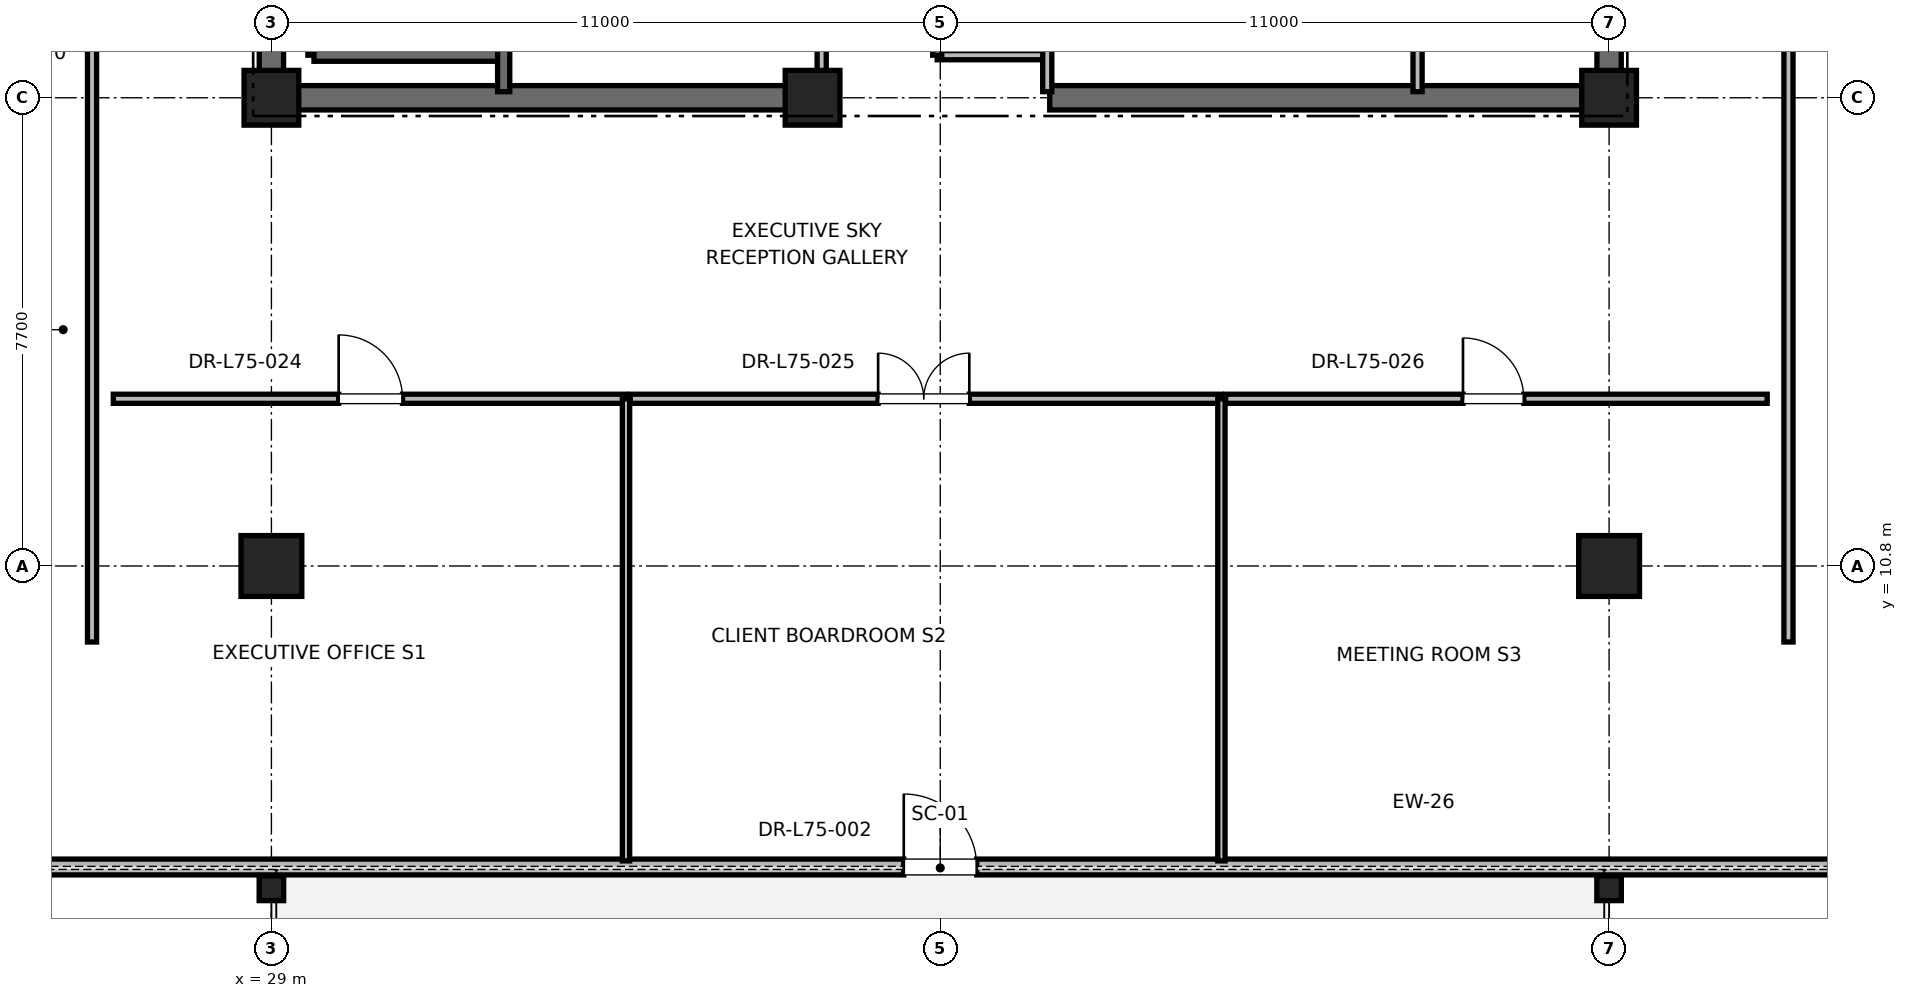
"""IFC4 building model, lengths in metres.
Left out: names, types, materials, properties, quantities, classifications, styles, units other than length and angle.
Written with IfcOpenShell. Run it as: python <this file> out.ifc"""

import sys

from ifc_helpers import new_model, si_unit, direction, frame, frame_2d, origin, origin_2d, place, context, subcontext, project, spatial, rectangle, i_section, extrude, element, fill, save


model = new_model("IFC4")
c1 = context("Model", 3, precision=1e-05, world=origin(), true_north=direction((0.0, 1.0)))
c2 = subcontext(c1, "Body", "Model", "MODEL_VIEW")
j1 = project(units=[si_unit("LENGTHUNIT", "METRE"), si_unit("PLANEANGLEUNIT", "RADIAN")], contexts=[c1])
p1 = place(None, origin())
s1 = spatial("IfcSite", under=j1, at=p1, CompositionType="ELEMENT")
p2 = place(p1, origin())
s2 = spatial("IfcBuilding", under=s1, at=p2, CompositionType="ELEMENT")
p3 = place(p2, frame((0.0, 0.0, 322.8)))
s3 = spatial("IfcBuildingStorey", under=s2, at=p3, CompositionType="ELEMENT", Elevation=322.8)
for number, where, z_axis, x_axis in (
    (1, (29.0, 10.8, 0.0), (0.0, 0.0, 1.0), (1.0, 0.0, 0.0)),
    (2, (51.0, 10.8, 0.0), (0.0, 0.0, 1.0), (1.0, 0.0, 0.0)),
):
    element("IfcColumn", number, at=place(p3, frame(where, z_axis=z_axis, x_axis=x_axis)), inside=s3, PredefinedType="COLUMN", context=c2, shape_type="SweptSolid", body=[
        extrude(rectangle(XDim=1.0, YDim=1.0, at=origin_2d()), origin(), (0.0, 0.0, 1.0), 4.0),
    ])
for number, where, z_axis, x_axis in (
    (3, (29.0, 5.5, 0.0), (0.0, 0.0, 1.0), (1.0, 0.0, 0.0)),
    (4, (51.0, 5.5, 0.0), (0.0, 0.0, 1.0), (1.0, 0.0, 0.0)),
):
    element("IfcColumn", number, at=place(p3, frame(where, z_axis=z_axis, x_axis=x_axis)), inside=s3, PredefinedType="COLUMN", context=c2, shape_type="SweptSolid", body=[
        extrude(i_section(OverallWidth=0.403, OverallDepth=0.406, WebThickness=0.027, FlangeThickness=0.043, FilletRadius=0.015, at=origin_2d()), origin(), (0.0, 0.0, 1.0), 4.0),
    ])
for number, where, z_axis, x_axis in (
    (5, (29.0, 18.5, 0.0), (0.0, 0.0, 1.0), (1.0, 0.0, 0.0)),
    (6, (51.0, 18.5, 0.0), (0.0, 0.0, 1.0), (1.0, 0.0, 0.0)),
    (7, (37.9, 18.5, 0.0), (0.0, 0.0, 1.0), (1.0, 0.0, 0.0)),
):
    element("IfcColumn", number, at=place(p3, frame(where, z_axis=z_axis, x_axis=x_axis)), inside=s3, PredefinedType="PILASTER", context=c2, shape_type="SweptSolid", body=[
        extrude(rectangle(XDim=0.9, YDim=0.9, at=origin_2d()), origin(), (0.0, 0.0, 1.0), 4.0),
    ])
for number, where, z_axis, x_axis in (
    (8, (29.0, 18.5, 0.0), (0.0, 0.0, 1.0), (1.0, 0.0, 0.0)),
    (9, (41.8, 18.5, 0.0), (0.0, 0.0, 1.0), (1.0, 0.0, 0.0)),
):
    element("IfcWall", number, at=place(p3, frame(where, z_axis=z_axis, x_axis=x_axis)), inside=s3, PredefinedType="SHEAR", context=c2, shape_type="SweptSolid", body=[
        extrude(rectangle(XDim=9.2, YDim=0.4, at=frame_2d((4.6, 0.0))), origin(), (0.0, 0.0, 1.0), 3.785),
    ])
p4 = place(p3, frame((29.0, 18.5, 0.0), z_axis=(0.0, 0.0, 1.0), x_axis=(0.0, 1.0, 0.0)))
e10 = element("IfcWall", 10, at=p4, inside=s3, PredefinedType="SHEAR", context=c2, shape_type="SweptSolid", body=[
    extrude(rectangle(XDim=8.8, YDim=0.4, at=frame_2d((4.4, 0.0))), origin(), (0.0, 0.0, 1.0), 3.785),
])
p5 = place(p3, frame((51.0, 18.5, 0.0), z_axis=(0.0, 0.0, 1.0), x_axis=(0.0, 1.0, 0.0)))
e11 = element("IfcWall", 11, at=p5, inside=s3, PredefinedType="SHEAR", context=c2, shape_type="SweptSolid", body=[
    extrude(rectangle(XDim=5.8, YDim=0.4, at=frame_2d((2.9, 0.0))), origin(), (0.0, 0.0, 1.0), 3.785),
])
p6 = place(p3, frame((18.9, 5.85, 0.0), z_axis=(0.0, 0.0, 1.0), x_axis=(1.0, 0.0, 0.0)))
e12 = element("IfcWall", 12, at=p6, inside=s3, PredefinedType="PARAPET", context=c2, shape_type="SweptSolid", body=[
    extrude(rectangle(XDim=42.2, YDim=0.26, at=frame_2d((21.1, 0.0))), origin(), (0.0, 0.0, 1.0), 3.196),
])
p7 = place(p6, frame((4.2, 0.0, 0.85)))
e13 = element("IfcOpeningElement", 13, at=p7, cuts=e12, PredefinedType="OPENING", context=c2, shape_type="SweptSolid", body=[
    extrude(rectangle(XDim=1.6, YDim=2.1, at=frame_2d((0.8, 1.05))), frame((0.0, 0.13, 0.0), z_axis=(0.0, -1.0, 0.0), x_axis=(1.0, 0.0, 0.0)), (0.0, 0.0, 1.0), 0.26),
])
p8 = place(p6, frame((20.5, 0.0, 0.0)))
e14 = element("IfcOpeningElement", 14, at=p8, cuts=e12, PredefinedType="OPENING", context=c2, shape_type="SweptSolid", body=[
    extrude(rectangle(XDim=1.2, YDim=2.2, at=frame_2d((0.6, 1.1))), frame((0.0, 0.13, 0.0), z_axis=(0.0, -1.0, 0.0), x_axis=(1.0, 0.0, 0.0)), (0.0, 0.0, 1.0), 0.26),
])
p9 = place(p6, frame((36.4, 0.0, 0.85)))
e15 = element("IfcOpeningElement", 15, at=p9, cuts=e12, PredefinedType="OPENING", context=c2, shape_type="SweptSolid", body=[
    extrude(rectangle(XDim=1.6, YDim=2.1, at=frame_2d((0.8, 1.05))), frame((0.0, 0.13, 0.0), z_axis=(0.0, -1.0, 0.0), x_axis=(1.0, 0.0, 0.0)), (0.0, 0.0, 1.0), 0.26),
])
p10 = place(p3, frame((29.7, 19.2, 0.0), z_axis=(0.0, 0.0, 1.0), x_axis=(0.0, 1.0, 0.0)))
e16 = element("IfcWall", 16, at=p10, inside=s3, PredefinedType="SOLIDWALL", context=c2, shape_type="SweptSolid", body=[
    extrude(rectangle(XDim=8.15, YDim=0.2, at=frame_2d((4.075, 0.0))), origin(), (0.0, 0.0, 1.0), 3.785),
])
p11 = place(p3, frame((29.7, 19.2, 0.0), z_axis=(0.0, 0.0, 1.0), x_axis=(1.0, 0.0, 0.0)))
e17 = element("IfcWall", 17, at=p11, inside=s3, PredefinedType="SOLIDWALL", context=c2, shape_type="SweptSolid", body=[
    extrude(rectangle(XDim=3.12, YDim=0.2, at=frame_2d((1.56, 0.0))), origin(), (0.0, 0.0, 1.0), 3.785),
])
p12 = place(p3, frame((32.82, 18.6, 0.0), z_axis=(0.0, 0.0, 1.0), x_axis=(0.0, 1.0, 0.0)))
e18 = element("IfcWall", 18, at=p12, inside=s3, PredefinedType="SOLIDWALL", context=c2, shape_type="SweptSolid", body=[
    extrude(rectangle(XDim=8.78, YDim=0.2, at=frame_2d((4.39, 0.0))), origin(), (0.0, 0.0, 1.0), 3.785),
])
p13 = place(p3, frame((39.95, 19.2, 0.0), z_axis=(0.0, 0.0, 1.0), x_axis=(1.0, 0.0, 0.0)))
e19 = element("IfcWall", 19, at=p13, inside=s3, PredefinedType="PARTITIONING", context=c2, shape_type="SweptSolid", body=[
    extrude(rectangle(XDim=1.81, YDim=0.15, at=frame_2d((0.905, 0.0))), origin(), (0.0, 0.0, 1.0), 2.85),
])
p14 = place(p3, frame((41.76, 18.6, 0.0), z_axis=(0.0, 0.0, 1.0), x_axis=(0.0, 1.0, 0.0)))
e20 = element("IfcWall", 20, at=p14, inside=s3, PredefinedType="PARTITIONING", context=c2, shape_type="SweptSolid", body=[
    extrude(rectangle(XDim=3.6, YDim=0.15, at=frame_2d((1.8, 0.0))), origin(), (0.0, 0.0, 1.0), 2.85),
])
p15 = place(p3, frame((39.95, 19.2, 0.0), z_axis=(0.0, 0.0, 1.0), x_axis=(0.0, 1.0, 0.0)))
e21 = element("IfcWall", 21, at=p15, inside=s3, PredefinedType="PARTITIONING", context=c2, shape_type="SweptSolid", body=[
    extrude(rectangle(XDim=3.0, YDim=0.15, at=frame_2d((1.5, 0.0))), origin(), (0.0, 0.0, 1.0), 2.85),
])
p16 = place(p15, frame((1.05, 0.0, 0.0)))
e22 = element("IfcOpeningElement", 22, at=p16, cuts=e21, PredefinedType="OPENING", context=c2, shape_type="SweptSolid", body=[
    extrude(rectangle(XDim=0.9, YDim=2.1, at=frame_2d((0.45, 1.05))), frame((0.0, 0.075, 0.0), z_axis=(0.0, -1.0, 0.0), x_axis=(1.0, 0.0, 0.0)), (0.0, 0.0, 1.0), 0.15),
])
p17 = place(p3, frame((38.05, 18.6, 0.0), z_axis=(0.0, 0.0, 1.0), x_axis=(0.0, 1.0, 0.0)))
e23 = element("IfcWall", 23, at=p17, inside=s3, PredefinedType="PARTITIONING", context=c2, shape_type="SweptSolid", body=[
    extrude(rectangle(XDim=8.78, YDim=0.15, at=frame_2d((4.39, 0.0))), origin(), (0.0, 0.0, 1.0), 2.85),
])
p18 = place(p17, frame((3.89, 0.0, 0.0)))
e24 = element("IfcOpeningElement", 24, at=p18, cuts=e23, PredefinedType="OPENING", context=c2, shape_type="SweptSolid", body=[
    extrude(rectangle(XDim=1.0, YDim=2.15, at=frame_2d((0.5, 1.075))), frame((0.0, 0.075, 0.0), z_axis=(0.0, -1.0, 0.0), x_axis=(1.0, 0.0, 0.0)), (0.0, 0.0, 1.0), 0.15),
])
p19 = place(p3, frame((47.85, 18.6, 0.0), z_axis=(0.0, 0.0, 1.0), x_axis=(0.0, 1.0, 0.0)))
e25 = element("IfcWall", 25, at=p19, inside=s3, PredefinedType="PARTITIONING", context=c2, shape_type="SweptSolid", body=[
    extrude(rectangle(XDim=2.54, YDim=0.15, at=frame_2d((1.27, 0.0))), origin(), (0.0, 0.0, 1.0), 2.85),
])
p20 = place(p3, frame((26.4, 13.55, 0.0), z_axis=(0.0, 0.0, 1.0), x_axis=(1.0, 0.0, 0.0)))
e26 = element("IfcWall", 26, at=p20, inside=s3, PredefinedType="PARTITIONING", context=c2, shape_type="SweptSolid", body=[
    extrude(rectangle(XDim=8.432, YDim=0.15, at=frame_2d((4.216, 0.0))), origin(), (0.0, 0.0, 1.0), 2.85),
])
p21 = place(p20, frame((3.706, 0.0, 0.0)))
e27 = element("IfcOpeningElement", 27, at=p21, cuts=e26, PredefinedType="OPENING", context=c2, shape_type="SweptSolid", body=[
    extrude(rectangle(XDim=1.05, YDim=2.2, at=frame_2d((0.525, 1.1))), frame((0.0, 0.075, 0.0), z_axis=(0.0, -1.0, 0.0), x_axis=(1.0, 0.0, 0.0)), (0.0, 0.0, 1.0), 0.15),
])
p22 = place(p3, frame((34.832, 5.95, 0.0), z_axis=(0.0, 0.0, 1.0), x_axis=(0.0, 1.0, 0.0)))
e28 = element("IfcWall", 28, at=p22, inside=s3, PredefinedType="PARTITIONING", context=c2, shape_type="SweptSolid", body=[
    extrude(rectangle(XDim=7.6, YDim=0.12, at=frame_2d((3.8, 0.0))), origin(), (0.0, 0.0, 1.0), 2.415),
])
p23 = place(p3, frame((34.902, 13.55, 0.0), z_axis=(0.0, 0.0, 1.0), x_axis=(1.0, 0.0, 0.0)))
e29 = element("IfcWall", 29, at=p23, inside=s3, PredefinedType="PARTITIONING", context=c2, shape_type="SweptSolid", body=[
    extrude(rectangle(XDim=9.722, YDim=0.15, at=frame_2d((4.861, 0.0))), origin(), (0.0, 0.0, 1.0), 2.85),
])
p24 = place(p23, frame((4.076, 0.0, 0.0)))
e30 = element("IfcOpeningElement", 30, at=p24, cuts=e29, PredefinedType="OPENING", context=c2, shape_type="SweptSolid", body=[
    extrude(rectangle(XDim=1.5, YDim=2.25, at=frame_2d((0.75, 1.125))), frame((0.0, 0.075, 0.0), z_axis=(0.0, -1.0, 0.0), x_axis=(1.0, 0.0, 0.0)), (0.0, 0.0, 1.0), 0.15),
])
p25 = place(p3, frame((44.624, 5.95, 0.0), z_axis=(0.0, 0.0, 1.0), x_axis=(0.0, 1.0, 0.0)))
e31 = element("IfcWall", 31, at=p25, inside=s3, PredefinedType="PARTITIONING", context=c2, shape_type="SweptSolid", body=[
    extrude(rectangle(XDim=7.6, YDim=0.12, at=frame_2d((3.8, 0.0))), origin(), (0.0, 0.0, 1.0), 2.415),
])
p26 = place(p3, frame((44.694, 13.55, 0.0), z_axis=(0.0, 0.0, 1.0), x_axis=(1.0, 0.0, 0.0)))
e32 = element("IfcWall", 32, at=p26, inside=s3, PredefinedType="PARTITIONING", context=c2, shape_type="SweptSolid", body=[
    extrude(rectangle(XDim=8.906, YDim=0.15, at=frame_2d((4.453, 0.0))), origin(), (0.0, 0.0, 1.0), 2.85),
])
p27 = place(p26, frame((3.903, 0.0, 0.0)))
e33 = element("IfcOpeningElement", 33, at=p27, cuts=e32, PredefinedType="OPENING", context=c2, shape_type="SweptSolid", body=[
    extrude(rectangle(XDim=1.0, YDim=2.15, at=frame_2d((0.5, 1.075))), frame((0.0, 0.075, 0.0), z_axis=(0.0, -1.0, 0.0), x_axis=(1.0, 0.0, 0.0)), (0.0, 0.0, 1.0), 0.15),
])
p28 = place(p3, frame((26.05, 9.55, 0.0), z_axis=(0.0, 0.0, 1.0), x_axis=(0.0, 1.0, 0.0)))
e34 = element("IfcWall", 34, at=p28, inside=s3, PredefinedType="PARTITIONING", context=c2, shape_type="SweptSolid", body=[
    extrude(rectangle(XDim=12.565, YDim=0.15, at=frame_2d((6.282, 0.0))), origin(), (0.0, 0.0, 1.0), 2.85),
])
p29 = place(p28, frame((10.272, 0.0, 0.0)))
e35 = element("IfcOpeningElement", 35, at=p29, cuts=e34, PredefinedType="OPENING", context=c2, shape_type="SweptSolid", body=[
    extrude(rectangle(XDim=1.0, YDim=2.15, at=frame_2d((0.5, 1.075))), frame((0.0, 0.075, 0.0), z_axis=(0.0, -1.0, 0.0), x_axis=(1.0, 0.0, 0.0)), (0.0, 0.0, 1.0), 0.15),
])
p30 = place(p3, frame((53.95, 9.55, 0.0), z_axis=(0.0, 0.0, 1.0), x_axis=(0.0, 1.0, 0.0)))
e36 = element("IfcWall", 36, at=p30, inside=s3, PredefinedType="PARTITIONING", context=c2, shape_type="SweptSolid", body=[
    extrude(rectangle(XDim=15.078, YDim=0.15, at=frame_2d((7.539, 0.0))), origin(), (0.0, 0.0, 1.0), 2.85),
])
p31 = place(p30, frame((11.529, 0.0, 0.0)))
e37 = element("IfcOpeningElement", 37, at=p31, cuts=e36, PredefinedType="OPENING", context=c2, shape_type="SweptSolid", body=[
    extrude(rectangle(XDim=1.0, YDim=2.15, at=frame_2d((0.5, 1.075))), frame((0.0, 0.075, 0.0), z_axis=(0.0, -1.0, 0.0), x_axis=(1.0, 0.0, 0.0)), (0.0, 0.0, 1.0), 0.15),
])
p32 = place(p8, origin())
e38 = element("IfcDoor", 38, at=p32, inside=s3, OperationType="SINGLE_SWING_LEFT", PredefinedType="DOOR", context=c2, shape_type="SweptSolid", body=[
    extrude(rectangle(XDim=1.2, YDim=2.2, at=frame_2d((0.6, 1.1))), frame((0.0, 0.025, 0.0), z_axis=(0.0, -1.0, 0.0), x_axis=(1.0, 0.0, 0.0)), (0.0, 0.0, 1.0), 0.05),
])
fill(e14, e38)
p33 = place(p21, origin())
e39 = element("IfcDoor", 39, at=p33, inside=s3, OperationType="SINGLE_SWING_LEFT", PredefinedType="DOOR", context=c2, shape_type="SweptSolid", body=[
    extrude(rectangle(XDim=1.05, YDim=2.2, at=frame_2d((0.525, 1.1))), frame((0.0, 0.025, 0.0), z_axis=(0.0, -1.0, 0.0), x_axis=(1.0, 0.0, 0.0)), (0.0, 0.0, 1.0), 0.05),
])
fill(e27, e39)
p34 = place(p24, origin())
e40 = element("IfcDoor", 40, at=p34, inside=s3, OperationType="DOUBLE_DOOR_SINGLE_SWING", PredefinedType="DOOR", context=c2, shape_type="SweptSolid", body=[
    extrude(rectangle(XDim=1.5, YDim=2.25, at=frame_2d((0.75, 1.125))), frame((0.0, 0.025, 0.0), z_axis=(0.0, -1.0, 0.0), x_axis=(1.0, 0.0, 0.0)), (0.0, 0.0, 1.0), 0.05),
])
fill(e30, e40)
p35 = place(p27, origin())
e41 = element("IfcDoor", 41, at=p35, inside=s3, OperationType="SINGLE_SWING_LEFT", PredefinedType="DOOR", context=c2, shape_type="SweptSolid", body=[
    extrude(rectangle(XDim=1.0, YDim=2.15, at=frame_2d((0.5, 1.075))), frame((0.0, 0.025, 0.0), z_axis=(0.0, -1.0, 0.0), x_axis=(1.0, 0.0, 0.0)), (0.0, 0.0, 1.0), 0.05),
])
fill(e33, e41)
save(model, sys.argv[1])
